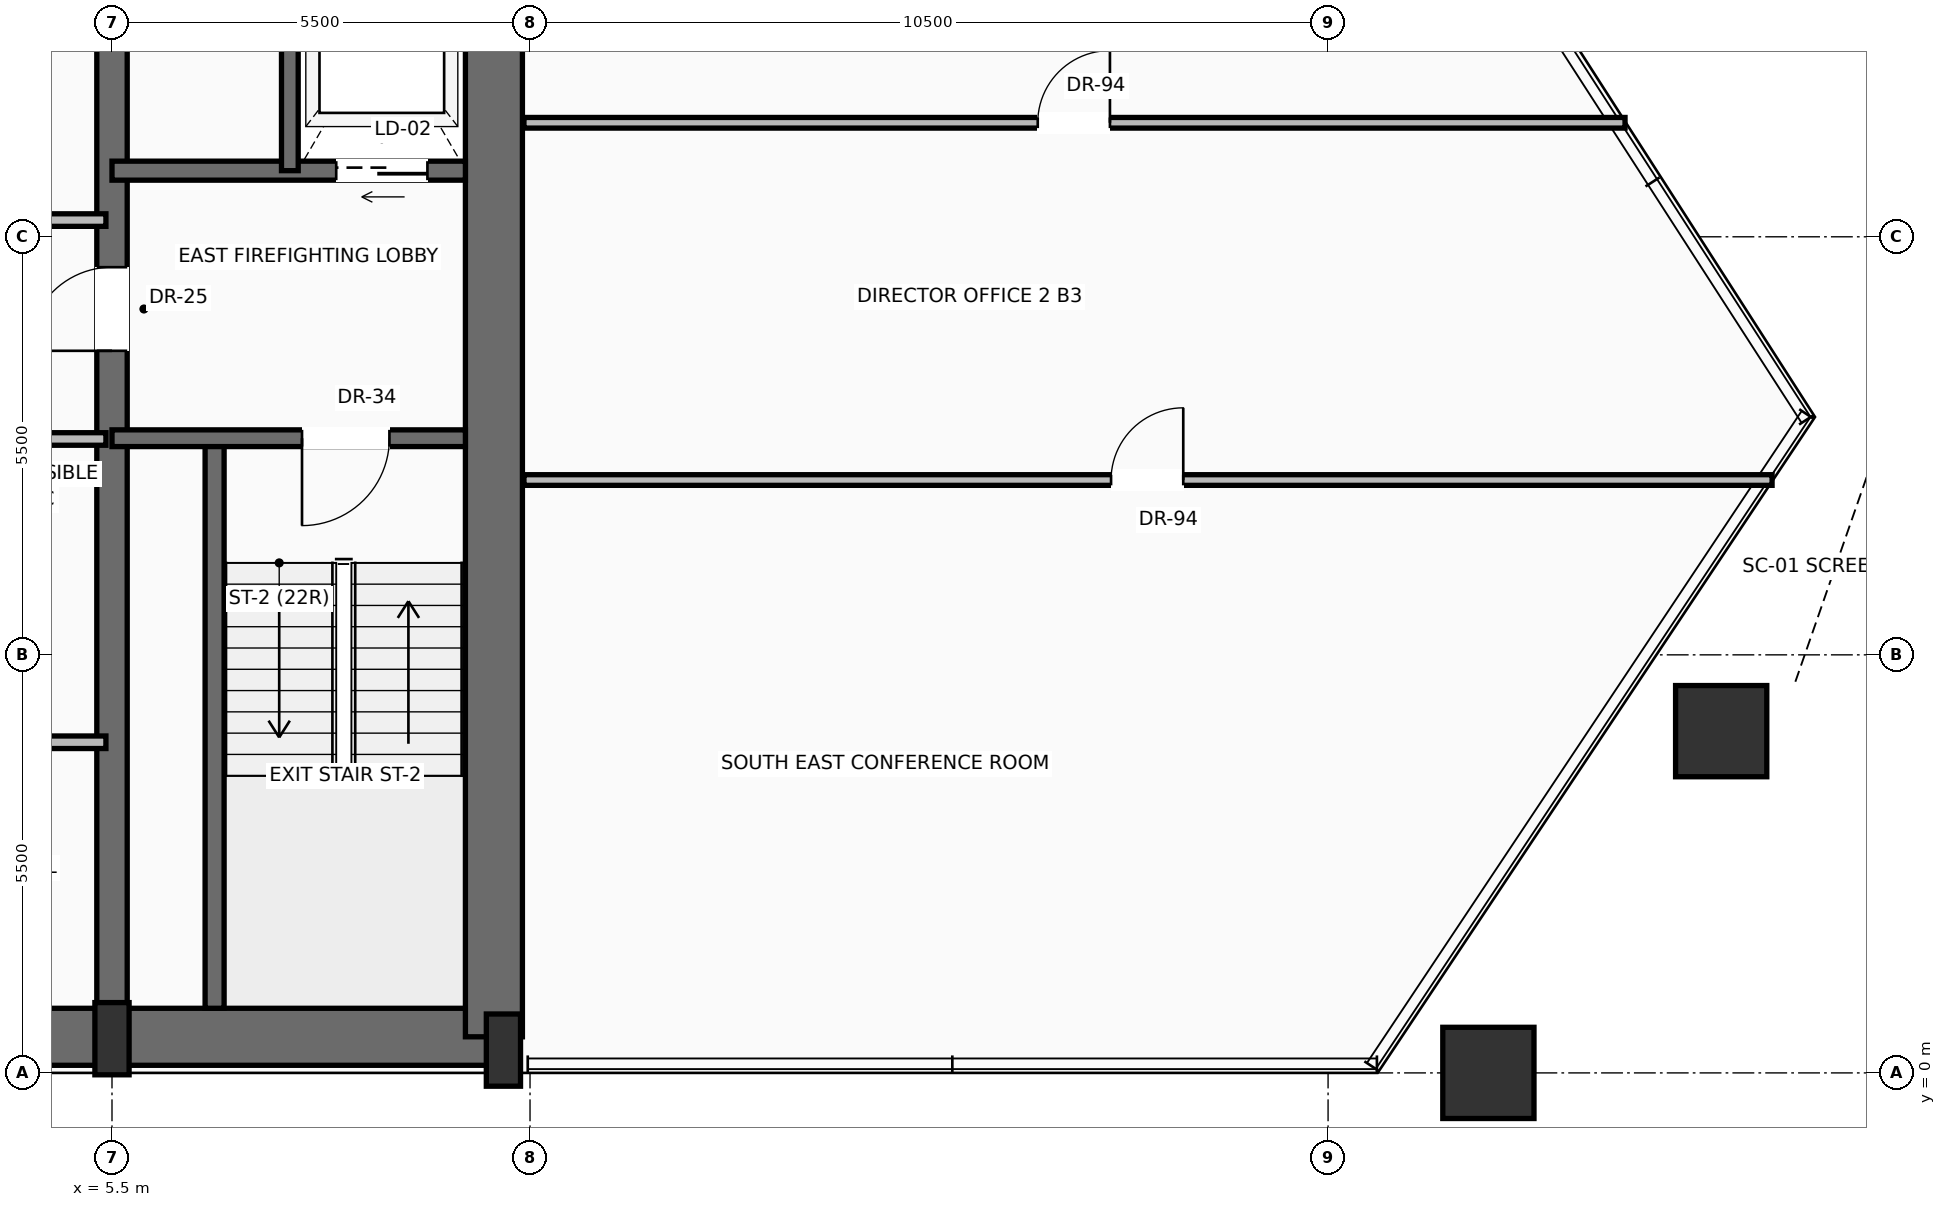
"""IFC4 building model, lengths in metres.
Left out: names, types, materials, properties, quantities, classifications, styles, units other than length and angle.
Written with IfcOpenShell. Run it as: python <this file> out.ifc"""

import sys

from ifc_helpers import new_model, si_unit, direction, frame, frame_2d, origin, origin_2d, place, context, subcontext, project, spatial, rectangle, hollow_rectangle, extrude, source, transform, mapped, element, fill, save


model = new_model("IFC4")
c1 = context("Model", 3, precision=1e-05, world=origin(), true_north=direction((0.0, 1.0)))
c2 = subcontext(c1, "Body", "Model", "MODEL_VIEW")
j1 = project(units=[si_unit("LENGTHUNIT", "METRE"), si_unit("PLANEANGLEUNIT", "RADIAN")], contexts=[c1])
p1 = place(None, origin())
s1 = spatial("IfcSite", under=j1, at=p1, CompositionType="ELEMENT")
p2 = place(p1, origin())
s2 = spatial("IfcBuilding", under=s1, at=p2, CompositionType="ELEMENT")
p3 = place(p2, frame((0.0, 0.0, 109.9)))
s3 = spatial("IfcBuildingStorey", under=s2, at=p3, CompositionType="ELEMENT", Elevation=109.9)
p4 = place(p3, frame((-10.65, 0.475, 0.0), z_axis=(0.0, 0.0, 1.0), x_axis=(1.0, 0.0, 0.0)))
e1 = element("IfcWall", 1, at=p4, inside=s3, PredefinedType="SHEAR", context=c2, shape_type="SweptSolid", body=[
    extrude(rectangle(XDim=21.3, YDim=0.75, at=frame_2d((10.65, 0.0))), origin(), (0.0, 0.0, 1.0), 3.45),
])
p5 = place(p3, frame((10.525, 0.475, 0.0), z_axis=(0.0, 0.0, 1.0), x_axis=(0.0, 1.0, 0.0)))
e2 = element("IfcWall", 2, at=p5, inside=s3, PredefinedType="SHEAR", context=c2, shape_type="SweptSolid", body=[
    extrude(rectangle(XDim=15.65, YDim=0.75, at=frame_2d((7.825, 0.0))), origin(), (0.0, 0.0, 1.0), 3.45),
])
p6 = place(p3, frame((5.5, 0.475, 0.0), z_axis=(0.0, 0.0, 1.0), x_axis=(0.0, 1.0, 0.0)))
e3 = element("IfcWall", 3, at=p6, inside=s3, PredefinedType="SHEAR", context=c2, shape_type="SweptSolid", body=[
    extrude(rectangle(XDim=15.65, YDim=0.4, at=frame_2d((7.825, 0.0))), origin(), (0.0, 0.0, 1.0), 3.45),
])
p7 = place(p6, frame((9.025, 0.0, 0.0)))
e4 = element("IfcOpeningElement", 4, at=p7, cuts=e3, PredefinedType="OPENING", context=c2, shape_type="SweptSolid", body=[
    extrude(rectangle(XDim=1.1, YDim=2.2, at=frame_2d((0.55, 1.1))), frame((0.0, 0.21, 0.0), z_axis=(0.0, -1.0, 0.0), x_axis=(1.0, 0.0, 0.0)), (0.0, 0.0, 1.0), 0.42),
])
m1 = source(origin(), c2, "Body", "SweptSolid", [
    extrude(rectangle(XDim=0.45, YDim=0.95, at=origin_2d()), origin(), (0.0, 0.0, 1.0), 3.7),
])
for number, where, z_axis, x_axis in (
    (5, (5.5, 0.45, 0.0), (0.0, 0.0, 1.0), (1.0, 0.0, 0.0)),
    (6, (10.65, 0.3, 0.0), (0.0, 0.0, 1.0), (1.0, 0.0, 0.0)),
):
    element("IfcColumn", number, at=place(p3, frame(where, z_axis=z_axis, x_axis=x_axis)), inside=s3, PredefinedType="PILASTER", context=c2, shape_type="MappedRepresentation", body=[
        mapped(m1, transform((0.0, 0.0, 0.0), scale=1.0)),
    ])
m2 = source(origin(), c2, "Body", "SweptSolid", [
    extrude(hollow_rectangle(XDim=1.2, YDim=1.2, WallThickness=0.06, at=origin_2d()), origin(), (0.0, 0.0, 1.0), 3.692),
])
p8 = place(p3, frame((23.609, 0.0, 0.004), z_axis=(0.010978174373, 0.0, 0.999939738028), x_axis=(0.0, 1.0, 0.0)))
e7 = element("IfcColumn", 7, at=p8, inside=s3, PredefinedType="COLUMN", context=c2, shape_type="MappedRepresentation", body=[
    mapped(m2, transform((0.0, 0.0, 0.0), scale=1.0)),
])
m3 = source(origin(), c2, "Body", "SweptSolid", [
    extrude(hollow_rectangle(XDim=1.2, YDim=1.2, WallThickness=0.06, at=origin_2d()), origin(), (0.0, 0.0, 1.0), 3.692),
])
p9 = place(p3, frame((26.672, 4.496, 0.004), z_axis=(-0.001587102981, -0.015738771232, 0.999874878264), x_axis=(0.994954064092, -0.100331502261, 0.0)))
e8 = element("IfcColumn", 8, at=p9, inside=s3, PredefinedType="COLUMN", context=c2, shape_type="MappedRepresentation", body=[
    mapped(m3, transform((0.0, 0.0, 0.0), scale=1.0)),
])
p10 = place(p3, frame((6.85, 0.85, 0.0), z_axis=(0.0, 0.0, 1.0), x_axis=(0.0, 1.0, 0.0)))
e9 = element("IfcWall", 9, at=p10, inside=s3, PredefinedType="SOLIDWALL", context=c2, shape_type="SweptSolid", body=[
    extrude(rectangle(XDim=7.5, YDim=0.25, at=frame_2d((3.75, 0.0))), origin(), (0.0, 0.0, 1.0), 3.45),
])
p11 = place(p3, frame((10.15, 8.35, 0.0), z_axis=(0.0, 0.0, 1.0), x_axis=(-1.0, 0.0, 0.0)))
e10 = element("IfcWall", 10, at=p11, inside=s3, PredefinedType="SOLIDWALL", context=c2, shape_type="SweptSolid", body=[
    extrude(rectangle(XDim=4.65, YDim=0.22, at=frame_2d((2.325, 0.0))), origin(), (0.0, 0.0, 1.0), 3.45),
])
p12 = place(p11, frame((1.0, 0.0, 0.0)))
e11 = element("IfcOpeningElement", 11, at=p12, cuts=e10, PredefinedType="OPENING", context=c2, shape_type="SweptSolid", body=[
    extrude(rectangle(XDim=1.15, YDim=2.2, at=frame_2d((0.575, 1.1))), frame((0.0, 0.12, 0.0), z_axis=(0.0, -1.0, 0.0), x_axis=(1.0, 0.0, 0.0)), (0.0, 0.0, 1.0), 0.24),
])
p13 = place(p3, frame((10.15, 11.87, 0.0), z_axis=(0.0, 0.0, 1.0), x_axis=(-1.0, 0.0, 0.0)))
e12 = element("IfcWall", 12, at=p13, inside=s3, PredefinedType="SOLIDWALL", context=c2, shape_type="SweptSolid", body=[
    extrude(rectangle(XDim=4.65, YDim=0.25, at=frame_2d((2.325, 0.0))), origin(), (0.0, 0.0, 1.0), 3.45),
])
p14 = place(p13, frame((0.5, 0.0, 0.0)))
e13 = element("IfcOpeningElement", 13, at=p14, cuts=e12, PredefinedType="OPENING", context=c2, shape_type="SweptSolid", body=[
    extrude(rectangle(XDim=1.2, YDim=2.25, at=frame_2d((0.6, 1.125))), frame((0.0, 0.135, 0.0), z_axis=(0.0, -1.0, 0.0), x_axis=(1.0, 0.0, 0.0)), (0.0, 0.0, 1.0), 0.27),
])
p15 = place(p3, frame((7.84, 11.87, 0.0), z_axis=(0.0, 0.0, 1.0), x_axis=(0.0, 1.0, 0.0)))
e14 = element("IfcWall", 14, at=p15, inside=s3, PredefinedType="SOLIDWALL", context=c2, shape_type="SweptSolid", body=[
    extrude(rectangle(XDim=3.88, YDim=0.22, at=frame_2d((1.94, 0.0))), origin(), (0.0, 0.0, 1.0), 3.45),
])
p16 = place(p3, frame((3.54, 8.34, 0.0), z_axis=(0.0, 0.0, 1.0), x_axis=(1.0, 0.0, 0.0)))
e15 = element("IfcWall", 15, at=p16, inside=s3, PredefinedType="PARTITIONING", context=c2, shape_type="SweptSolid", body=[
    extrude(rectangle(XDim=1.88, YDim=0.165, at=frame_2d((0.94, 0.0))), origin(), (0.0, 0.0, 1.0), 3.442),
])
p17 = place(p3, frame((1.8, 4.35, 0.0), z_axis=(0.0, 0.0, 1.0), x_axis=(1.0, 0.0, 0.0)))
e16 = element("IfcWall", 16, at=p17, inside=s3, PredefinedType="PARTITIONING", context=c2, shape_type="SweptSolid", body=[
    extrude(rectangle(XDim=3.62, YDim=0.165, at=frame_2d((1.81, 0.0))), origin(), (0.0, 0.0, 1.0), 3.442),
])
p18 = place(p17, frame((0.48, 0.0, 0.0)))
e17 = element("IfcOpeningElement", 17, at=p18, cuts=e16, PredefinedType="OPENING", context=c2, shape_type="SweptSolid", body=[
    extrude(rectangle(XDim=0.9, YDim=2.1, at=frame_2d((0.45, 1.05))), frame((0.0, 0.093, 0.0), z_axis=(0.0, -1.0, 0.0), x_axis=(1.0, 0.0, 0.0)), (0.0, 0.0, 1.0), 0.185),
])
p19 = place(p3, frame((3.54, 11.22, 0.0), z_axis=(0.0, 0.0, 1.0), x_axis=(1.0, 0.0, 0.0)))
e18 = element("IfcWall", 18, at=p19, inside=s3, PredefinedType="PARTITIONING", context=c2, shape_type="SweptSolid", body=[
    extrude(rectangle(XDim=1.88, YDim=0.165, at=frame_2d((0.94, 0.0))), origin(), (0.0, 0.0, 1.0), 3.442),
])
p20 = place(p3, frame((10.92, 7.8, 0.0), z_axis=(0.0, 0.0, 1.0), x_axis=(1.0, 0.0, 0.0)))
e19 = element("IfcWall", 19, at=p20, inside=s3, PredefinedType="PARTITIONING", context=c2, shape_type="SweptSolid", body=[
    extrude(rectangle(XDim=16.422, YDim=0.14, at=frame_2d((8.211, 0.0))), origin(), (0.0, 0.0, 1.0), 3.442),
])
p21 = place(p20, frame((7.725, 0.0, 0.0)))
e20 = element("IfcOpeningElement", 20, at=p21, cuts=e19, PredefinedType="OPENING", context=c2, shape_type="SweptSolid", body=[
    extrude(rectangle(XDim=0.95, YDim=2.2, at=frame_2d((0.475, 1.1))), frame((0.0, 0.08, 0.0), z_axis=(0.0, -1.0, 0.0), x_axis=(1.0, 0.0, 0.0)), (0.0, 0.0, 1.0), 0.16),
])
p22 = place(p3, frame((10.92, 12.5, 0.0), z_axis=(0.0, 0.0, 1.0), x_axis=(1.0, 0.0, 0.0)))
e21 = element("IfcWall", 21, at=p22, inside=s3, PredefinedType="PARTITIONING", context=c2, shape_type="SweptSolid", body=[
    extrude(rectangle(XDim=14.487, YDim=0.14, at=frame_2d((7.244, 0.0))), origin(), (0.0, 0.0, 1.0), 3.442),
])
p23 = place(p22, frame((6.76, 0.0, 0.0)))
e22 = element("IfcOpeningElement", 22, at=p23, cuts=e21, PredefinedType="OPENING", context=c2, shape_type="SweptSolid", body=[
    extrude(rectangle(XDim=0.95, YDim=2.2, at=frame_2d((0.475, 1.1))), frame((0.0, 0.08, 0.0), z_axis=(0.0, -1.0, 0.0), x_axis=(1.0, 0.0, 0.0)), (0.0, 0.0, 1.0), 0.16),
])
m4 = source(origin(), c2, "Body", "SweptSolid", [
    extrude(rectangle(XDim=1.15, YDim=2.2, at=frame_2d((0.575, 1.1))), frame((0.0, 0.025, 0.0), z_axis=(0.0, -1.0, 0.0), x_axis=(1.0, 0.0, 0.0)), (0.0, 0.0, 1.0), 0.05),
])
p24 = place(p12, origin())
e23 = element("IfcDoor", 23, at=p24, inside=s3, OperationType="SINGLE_SWING_RIGHT", PredefinedType="DOOR", context=c2, shape_type="MappedRepresentation", body=[
    mapped(m4, transform((0.0, 0.0, 0.0), scale=1.0)),
])
fill(e11, e23)
m5 = source(origin(), c2, "Body", "SweptSolid", [
    extrude(rectangle(XDim=1.1, YDim=2.2, at=frame_2d((0.55, 1.1))), frame((0.0, 0.025, 0.0), z_axis=(0.0, -1.0, 0.0), x_axis=(1.0, 0.0, 0.0)), (0.0, 0.0, 1.0), 0.05),
])
p25 = place(p7, origin())
e24 = element("IfcDoor", 24, at=p25, inside=s3, OperationType="SINGLE_SWING_LEFT", PredefinedType="DOOR", context=c2, shape_type="MappedRepresentation", body=[
    mapped(m5, transform((0.0, 0.0, 0.0), scale=1.0)),
])
fill(e4, e24)
m6 = source(origin(), c2, "Body", "SweptSolid", [
    extrude(rectangle(XDim=1.2, YDim=2.25, at=frame_2d((0.6, 1.125))), frame((0.0, 0.025, 0.0), z_axis=(0.0, -1.0, 0.0), x_axis=(1.0, 0.0, 0.0)), (0.0, 0.0, 1.0), 0.05),
])
p26 = place(p14, origin())
e25 = element("IfcDoor", 25, at=p26, inside=s3, OperationType="SLIDING_TO_RIGHT", PredefinedType="DOOR", context=c2, shape_type="MappedRepresentation", body=[
    mapped(m6, transform((0.0, 0.0, 0.0), scale=1.0)),
])
fill(e13, e25)
m7 = source(origin(), c2, "Body", "SweptSolid", [
    extrude(rectangle(XDim=0.95, YDim=2.2, at=frame_2d((0.475, 1.1))), frame((0.0, 0.025, 0.0), z_axis=(0.0, -1.0, 0.0), x_axis=(1.0, 0.0, 0.0)), (0.0, 0.0, 1.0), 0.05),
])
p27 = place(p23, origin())
e26 = element("IfcDoor", 26, at=p27, inside=s3, OperationType="SINGLE_SWING_RIGHT", PredefinedType="DOOR", context=c2, shape_type="MappedRepresentation", body=[
    mapped(m7, transform((0.0, 0.0, 0.0), scale=1.0)),
])
fill(e22, e26)
p28 = place(p21, origin())
e27 = element("IfcDoor", 27, at=p28, inside=s3, OperationType="SINGLE_SWING_RIGHT", PredefinedType="DOOR", context=c2, shape_type="MappedRepresentation", body=[
    mapped(m7, transform((0.0, 0.0, 0.0), scale=1.0)),
])
fill(e20, e27)
save(model, sys.argv[1])
